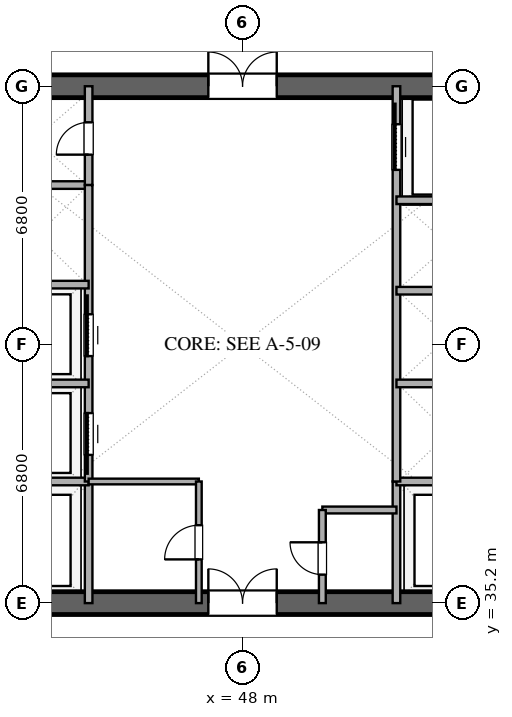
"""IFC4 building model, lengths in metres.
Left out: names, types, materials, properties, quantities, classifications, styles, units other than length and angle.
Written with IfcOpenShell. Run it as: python <this file> out.ifc"""

import sys

from ifc_helpers import new_model, si_unit, direction, frame, frame_2d, origin, place, context, subcontext, project, spatial, rectangle, extrude, element, fill, save


model = new_model("IFC4")
c1 = context("Model", 3, precision=1e-05, world=origin(), true_north=direction((0.0, 1.0)))
c2 = subcontext(c1, "Body", "Model", "MODEL_VIEW")
j1 = project(units=[si_unit("LENGTHUNIT", "METRE"), si_unit("PLANEANGLEUNIT", "RADIAN")], contexts=[c1])
p1 = place(None, origin())
s1 = spatial("IfcSite", under=j1, at=p1, CompositionType="ELEMENT")
p2 = place(p1, origin())
s2 = spatial("IfcBuilding", under=s1, at=p2, CompositionType="ELEMENT")
p3 = place(p2, frame((0.0, 0.0, 35.4)))
s3 = spatial("IfcBuildingStorey", under=s2, at=p3, CompositionType="ELEMENT", Elevation=35.4)
p4 = place(p3, frame((41.0, 35.2, 0.0), z_axis=(0.0, 0.0, 1.0), x_axis=(1.0, 0.0, 0.0)))
e1 = element("IfcWall", 1, at=p4, inside=s3, PredefinedType="SHEAR", context=c2, shape_type="SweptSolid", body=[
    extrude(rectangle(XDim=14.0, YDim=0.6, at=frame_2d((7.0, 0.0))), origin(), (0.0, 0.0, 1.0), 3.38),
])
p5 = place(p4, frame((6.1, 0.0, 0.0)))
e2 = element("IfcOpeningElement", 2, at=p5, cuts=e1, PredefinedType="OPENING", context=c2, shape_type="SweptSolid", body=[
    extrude(rectangle(XDim=1.8, YDim=2.25, at=frame_2d((0.9, 1.125))), frame((0.0, 0.31, 0.0), z_axis=(0.0, -1.0, 0.0), x_axis=(1.0, 0.0, 0.0)), (0.0, 0.0, 1.0), 0.62),
])
p6 = place(p3, frame((41.0, 48.8, 0.0), z_axis=(0.0, 0.0, 1.0), x_axis=(1.0, 0.0, 0.0)))
e3 = element("IfcWall", 3, at=p6, inside=s3, PredefinedType="SHEAR", context=c2, shape_type="SweptSolid", body=[
    extrude(rectangle(XDim=14.0, YDim=0.6, at=frame_2d((7.0, 0.0))), origin(), (0.0, 0.0, 1.0), 3.38),
])
p7 = place(p6, frame((6.1, 0.0, 0.0)))
e4 = element("IfcOpeningElement", 4, at=p7, cuts=e3, PredefinedType="OPENING", context=c2, shape_type="SweptSolid", body=[
    extrude(rectangle(XDim=1.8, YDim=2.25, at=frame_2d((0.9, 1.125))), frame((0.0, 0.31, 0.0), z_axis=(0.0, -1.0, 0.0), x_axis=(1.0, 0.0, 0.0)), (0.0, 0.0, 1.0), 0.62),
])
p8 = place(p3, frame((43.95, 35.2, 0.0), z_axis=(0.0, 0.0, 1.0), x_axis=(0.0, 1.0, 0.0)))
e5 = element("IfcWall", 5, at=p8, inside=s3, PredefinedType="SOLIDWALL", context=c2, shape_type="SweptSolid", body=[
    extrude(rectangle(XDim=3.2, YDim=0.2, at=frame_2d((1.6, 0.0))), origin(), (0.0, 0.0, 1.0), 2.74),
])
p9 = place(p3, frame((41.0, 38.4, 0.0), z_axis=(0.0, 0.0, 1.0), x_axis=(1.0, 0.0, 0.0)))
e6 = element("IfcWall", 6, at=p9, inside=s3, PredefinedType="SOLIDWALL", context=c2, shape_type="SweptSolid", body=[
    extrude(rectangle(XDim=2.95, YDim=0.2, at=frame_2d((1.475, 0.0))), origin(), (0.0, 0.0, 1.0), 2.74),
])
p10 = place(p3, frame((52.05, 35.2, 0.0), z_axis=(0.0, 0.0, 1.0), x_axis=(0.0, 1.0, 0.0)))
e7 = element("IfcWall", 7, at=p10, inside=s3, PredefinedType="SOLIDWALL", context=c2, shape_type="SweptSolid", body=[
    extrude(rectangle(XDim=3.2, YDim=0.2, at=frame_2d((1.6, 0.0))), origin(), (0.0, 0.0, 1.0), 2.74),
])
for number, where, z_axis, x_axis in (
    (8, (52.05, 38.4, 0.0), (0.0, 0.0, 1.0), (1.0, 0.0, 0.0)),
    (9, (41.0, 46.2, 0.0), (0.0, 0.0, 1.0), (1.0, 0.0, 0.0)),
):
    element("IfcWall", number, at=place(p3, frame(where, z_axis=z_axis, x_axis=x_axis)), inside=s3, PredefinedType="SOLIDWALL", context=c2, shape_type="SweptSolid", body=[
        extrude(rectangle(XDim=2.95, YDim=0.2, at=frame_2d((1.475, 0.0))), origin(), (0.0, 0.0, 1.0), 2.74),
    ])
p11 = place(p3, frame((43.95, 46.2, 0.0), z_axis=(0.0, 0.0, 1.0), x_axis=(0.0, 1.0, 0.0)))
e10 = element("IfcWall", 10, at=p11, inside=s3, PredefinedType="SOLIDWALL", context=c2, shape_type="SweptSolid", body=[
    extrude(rectangle(XDim=2.6, YDim=0.2, at=frame_2d((1.3, 0.0))), origin(), (0.0, 0.0, 1.0), 2.74),
])
p12 = place(p11, frame((0.8, 0.0, 0.0)))
e11 = element("IfcOpeningElement", 11, at=p12, cuts=e10, PredefinedType="OPENING", context=c2, shape_type="SweptSolid", body=[
    extrude(rectangle(XDim=0.85, YDim=2.15, at=frame_2d((0.425, 1.075))), frame((0.0, 0.11, 0.0), z_axis=(0.0, -1.0, 0.0), x_axis=(1.0, 0.0, 0.0)), (0.0, 0.0, 1.0), 0.22),
])
p13 = place(p3, frame((43.95, 38.4, 0.0), z_axis=(0.0, 0.0, 1.0), x_axis=(0.0, 1.0, 0.0)))
e12 = element("IfcWall", 12, at=p13, inside=s3, PredefinedType="SOLIDWALL", context=c2, shape_type="SweptSolid", body=[
    extrude(rectangle(XDim=7.8, YDim=0.2, at=frame_2d((3.9, 0.0))), origin(), (0.0, 0.0, 1.0), 2.74),
])
p14 = place(p13, frame((0.7, 0.0, 0.0)))
e13 = element("IfcOpeningElement", 13, at=p14, cuts=e12, PredefinedType="OPENING", context=c2, shape_type="SweptSolid", body=[
    extrude(rectangle(XDim=1.1, YDim=2.2, at=frame_2d((0.55, 1.1))), frame((0.0, 0.11, 0.0), z_axis=(0.0, -1.0, 0.0), x_axis=(1.0, 0.0, 0.0)), (0.0, 0.0, 1.0), 0.22),
])
p15 = place(p13, frame((3.3, 0.0, 0.0)))
e14 = element("IfcOpeningElement", 14, at=p15, cuts=e12, PredefinedType="OPENING", context=c2, shape_type="SweptSolid", body=[
    extrude(rectangle(XDim=1.1, YDim=2.2, at=frame_2d((0.55, 1.1))), frame((0.0, 0.11, 0.0), z_axis=(0.0, -1.0, 0.0), x_axis=(1.0, 0.0, 0.0)), (0.0, 0.0, 1.0), 0.22),
])
for number, where, z_axis, x_axis in (
    (15, (41.0, 40.98, 0.0), (0.0, 0.0, 1.0), (1.0, 0.0, 0.0)),
    (16, (41.0, 43.58, 0.0), (0.0, 0.0, 1.0), (1.0, 0.0, 0.0)),
):
    element("IfcWall", number, at=place(p3, frame(where, z_axis=z_axis, x_axis=x_axis)), inside=s3, PredefinedType="SOLIDWALL", context=c2, shape_type="SweptSolid", body=[
        extrude(rectangle(XDim=2.95, YDim=0.2, at=frame_2d((1.475, 0.0))), origin(), (0.0, 0.0, 1.0), 2.74),
    ])
p16 = place(p3, frame((52.05, 38.4, 0.0), z_axis=(0.0, 0.0, 1.0), x_axis=(0.0, 1.0, 0.0)))
e17 = element("IfcWall", 17, at=p16, inside=s3, PredefinedType="SOLIDWALL", context=c2, shape_type="SweptSolid", body=[
    extrude(rectangle(XDim=10.4, YDim=0.2, at=frame_2d((5.2, 0.0))), origin(), (0.0, 0.0, 1.0), 2.74),
])
p17 = place(p16, frame((8.2, 0.0, 0.0)))
e18 = element("IfcOpeningElement", 18, at=p17, cuts=e17, PredefinedType="OPENING", context=c2, shape_type="SweptSolid", body=[
    extrude(rectangle(XDim=1.2, YDim=2.2, at=frame_2d((0.6, 1.1))), frame((0.0, 0.11, 0.0), z_axis=(0.0, -1.0, 0.0), x_axis=(1.0, 0.0, 0.0)), (0.0, 0.0, 1.0), 0.22),
])
for number, where, z_axis, x_axis in (
    (19, (52.05, 40.98, 0.0), (0.0, 0.0, 1.0), (1.0, 0.0, 0.0)),
    (20, (52.05, 43.42, 0.0), (0.0, 0.0, 1.0), (1.0, 0.0, 0.0)),
    (21, (52.05, 45.8, 0.0), (0.0, 0.0, 1.0), (1.0, 0.0, 0.0)),
):
    element("IfcWall", number, at=place(p3, frame(where, z_axis=z_axis, x_axis=x_axis)), inside=s3, PredefinedType="SOLIDWALL", context=c2, shape_type="SweptSolid", body=[
        extrude(rectangle(XDim=2.95, YDim=0.2, at=frame_2d((1.475, 0.0))), origin(), (0.0, 0.0, 1.0), 2.74),
    ])
p18 = place(p3, frame((43.95, 38.4, 0.0), z_axis=(0.0, 0.0, 1.0), x_axis=(1.0, 0.0, 0.0)))
e22 = element("IfcWall", 22, at=p18, inside=s3, PredefinedType="PARTITIONING", context=c2, shape_type="SweptSolid", body=[
    extrude(rectangle(XDim=2.9, YDim=0.15, at=frame_2d((1.45, 0.0))), origin(), (0.0, 0.0, 1.0), 2.74),
])
p19 = place(p3, frame((46.85, 35.2, 0.0), z_axis=(0.0, 0.0, 1.0), x_axis=(0.0, 1.0, 0.0)))
e23 = element("IfcWall", 23, at=p19, inside=s3, PredefinedType="PARTITIONING", context=c2, shape_type="SweptSolid", body=[
    extrude(rectangle(XDim=3.2, YDim=0.15, at=frame_2d((1.6, 0.0))), origin(), (0.0, 0.0, 1.0), 2.74),
])
p20 = place(p19, frame((1.15, 0.0, 0.0)))
e24 = element("IfcOpeningElement", 24, at=p20, cuts=e23, PredefinedType="OPENING", context=c2, shape_type="SweptSolid", body=[
    extrude(rectangle(XDim=0.9, YDim=2.15, at=frame_2d((0.45, 1.075))), frame((0.0, 0.085, 0.0), z_axis=(0.0, -1.0, 0.0), x_axis=(1.0, 0.0, 0.0)), (0.0, 0.0, 1.0), 0.17),
])
p21 = place(p3, frame((50.1, 37.65, 0.0), z_axis=(0.0, 0.0, 1.0), x_axis=(1.0, 0.0, 0.0)))
e25 = element("IfcWall", 25, at=p21, inside=s3, PredefinedType="PLUMBINGWALL", context=c2, shape_type="SweptSolid", body=[
    extrude(rectangle(XDim=1.95, YDim=0.18, at=frame_2d((0.975, 0.0))), origin(), (0.0, 0.0, 1.0), 2.74),
])
p22 = place(p3, frame((50.1, 35.2, 0.0), z_axis=(0.0, 0.0, 1.0), x_axis=(0.0, 1.0, 0.0)))
e26 = element("IfcWall", 26, at=p22, inside=s3, PredefinedType="PLUMBINGWALL", context=c2, shape_type="SweptSolid", body=[
    extrude(rectangle(XDim=2.45, YDim=0.18, at=frame_2d((1.225, 0.0))), origin(), (0.0, 0.0, 1.0), 2.74),
])
p23 = place(p22, frame((0.75, 0.0, 0.0)))
e27 = element("IfcOpeningElement", 27, at=p23, cuts=e26, PredefinedType="OPENING", context=c2, shape_type="SweptSolid", body=[
    extrude(rectangle(XDim=0.85, YDim=2.1, at=frame_2d((0.425, 1.05))), frame((0.0, 0.1, 0.0), z_axis=(0.0, -1.0, 0.0), x_axis=(1.0, 0.0, 0.0)), (0.0, 0.0, 1.0), 0.2),
])
p24 = place(p5, origin())
e28 = element("IfcDoor", 28, at=p24, inside=s3, OperationType="DOUBLE_DOOR_SINGLE_SWING", PredefinedType="DOOR", context=c2, shape_type="SweptSolid", body=[
    extrude(rectangle(XDim=1.8, YDim=2.25, at=frame_2d((0.9, 1.125))), frame((0.0, 0.025, 0.0), z_axis=(0.0, -1.0, 0.0), x_axis=(1.0, 0.0, 0.0)), (0.0, 0.0, 1.0), 0.05),
])
fill(e2, e28)
p25 = place(p7, origin())
e29 = element("IfcDoor", 29, at=p25, inside=s3, OperationType="DOUBLE_DOOR_SINGLE_SWING", PredefinedType="DOOR", context=c2, shape_type="SweptSolid", body=[
    extrude(rectangle(XDim=1.8, YDim=2.25, at=frame_2d((0.9, 1.125))), frame((0.0, 0.025, 0.0), z_axis=(0.0, -1.0, 0.0), x_axis=(1.0, 0.0, 0.0)), (0.0, 0.0, 1.0), 0.05),
])
fill(e4, e29)
p26 = place(p12, origin())
e30 = element("IfcDoor", 30, at=p26, inside=s3, OperationType="SINGLE_SWING_LEFT", PredefinedType="DOOR", context=c2, shape_type="SweptSolid", body=[
    extrude(rectangle(XDim=0.85, YDim=2.15, at=frame_2d((0.425, 1.075))), frame((0.0, 0.025, 0.0), z_axis=(0.0, -1.0, 0.0), x_axis=(1.0, 0.0, 0.0)), (0.0, 0.0, 1.0), 0.05),
])
fill(e11, e30)
p27 = place(p14, origin())
e31 = element("IfcDoor", 31, at=p27, inside=s3, OperationType="SLIDING_TO_LEFT", PredefinedType="DOOR", context=c2, shape_type="SweptSolid", body=[
    extrude(rectangle(XDim=1.1, YDim=2.2, at=frame_2d((0.55, 1.1))), frame((0.0, 0.025, 0.0), z_axis=(0.0, -1.0, 0.0), x_axis=(1.0, 0.0, 0.0)), (0.0, 0.0, 1.0), 0.05),
])
fill(e13, e31)
p28 = place(p15, origin())
e32 = element("IfcDoor", 32, at=p28, inside=s3, OperationType="SLIDING_TO_RIGHT", PredefinedType="DOOR", context=c2, shape_type="SweptSolid", body=[
    extrude(rectangle(XDim=1.1, YDim=2.2, at=frame_2d((0.55, 1.1))), frame((0.0, 0.025, 0.0), z_axis=(0.0, -1.0, 0.0), x_axis=(1.0, 0.0, 0.0)), (0.0, 0.0, 1.0), 0.05),
])
fill(e14, e32)
p29 = place(p17, origin())
e33 = element("IfcDoor", 33, at=p29, inside=s3, OperationType="SLIDING_TO_RIGHT", PredefinedType="DOOR", context=c2, shape_type="SweptSolid", body=[
    extrude(rectangle(XDim=1.2, YDim=2.2, at=frame_2d((0.6, 1.1))), frame((0.0, 0.025, 0.0), z_axis=(0.0, -1.0, 0.0), x_axis=(1.0, 0.0, 0.0)), (0.0, 0.0, 1.0), 0.05),
])
fill(e18, e33)
p30 = place(p20, origin())
e34 = element("IfcDoor", 34, at=p30, inside=s3, OperationType="SINGLE_SWING_LEFT", PredefinedType="DOOR", context=c2, shape_type="SweptSolid", body=[
    extrude(rectangle(XDim=0.9, YDim=2.15, at=frame_2d((0.45, 1.075))), frame((0.0, 0.025, 0.0), z_axis=(0.0, -1.0, 0.0), x_axis=(1.0, 0.0, 0.0)), (0.0, 0.0, 1.0), 0.05),
])
fill(e24, e34)
p31 = place(p23, origin())
e35 = element("IfcDoor", 35, at=p31, inside=s3, OperationType="SINGLE_SWING_RIGHT", PredefinedType="DOOR", context=c2, shape_type="SweptSolid", body=[
    extrude(rectangle(XDim=0.85, YDim=2.1, at=frame_2d((0.425, 1.05))), frame((0.0, 0.025, 0.0), z_axis=(0.0, -1.0, 0.0), x_axis=(1.0, 0.0, 0.0)), (0.0, 0.0, 1.0), 0.05),
])
fill(e27, e35)
save(model, sys.argv[1])
